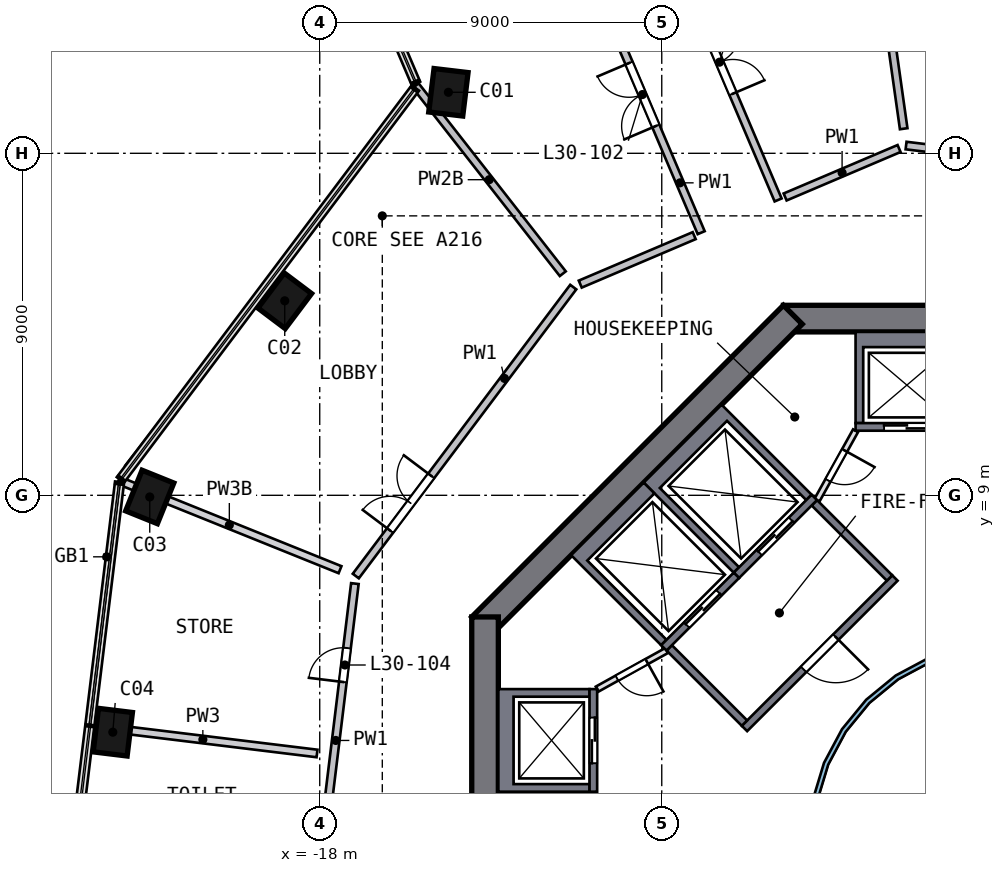
"""IFC4 building model, lengths in metres.
Left out: names, types, materials, properties, quantities, classifications, styles, units other than length and angle.
Written with IfcOpenShell. Run it as: python <this file> out.ifc"""

import sys

from ifc_helpers import new_model, si_unit, direction, frame, frame_2d, origin, origin_2d, place, context, subcontext, project, spatial, polyline, rectangle, outline, extrude, element, fill, save


model = new_model("IFC4")
c1 = context("Model", 3, precision=1e-05, world=origin(), true_north=direction((0.0, 1.0)))
c2 = subcontext(c1, "Body", "Model", "MODEL_VIEW")
j1 = project(units=[si_unit("LENGTHUNIT", "METRE"), si_unit("PLANEANGLEUNIT", "RADIAN")], contexts=[c1])
p1 = place(None, origin())
s1 = spatial("IfcSite", under=j1, at=p1, CompositionType="ELEMENT")
p2 = place(p1, origin())
s2 = spatial("IfcBuilding", under=s1, at=p2, CompositionType="ELEMENT")
p3 = place(p2, frame((0.0, 0.0, 128.0)))
s3 = spatial("IfcBuildingStorey", under=s2, at=p3, CompositionType="ELEMENT", Elevation=128.0)
p4 = place(p3, frame((-14.536, 19.665, 0.0), z_axis=(-0.065268001, -0.049080706, 0.996660008), x_axis=(0.11781391, 0.991424894, 0.056538149)))
e1 = element("IfcColumn", 1, at=p4, inside=s3, PredefinedType="COLUMN", context=c2, shape_type="SweptSolid", body=[
    extrude(rectangle(XDim=1.15, YDim=0.9, at=origin_2d()), origin(), (0.0, 0.0, 1.0), 4.706),
])
p5 = place(p3, frame((-18.865, 14.195, 0.0), z_axis=(-0.046860412, -0.063414643, 0.996886495), x_axis=(-0.599185859, -0.796717911, -0.078847169)))
e2 = element("IfcColumn", 2, at=p5, inside=s3, PredefinedType="COLUMN", context=c2, shape_type="SweptSolid", body=[
    extrude(rectangle(XDim=1.15, YDim=0.9, at=origin_2d()), origin(), (0.0, 0.0, 1.0), 4.705),
])
p6 = place(p3, frame((-22.438, 9.047, 0.0), z_axis=(-0.02957505, -0.075182891, 0.996731082), x_axis=(0.372682031, 0.924435727, 0.08078793)))
e3 = element("IfcColumn", 3, at=p6, inside=s3, PredefinedType="COLUMN", context=c2, shape_type="SweptSolid", body=[
    extrude(rectangle(XDim=1.15, YDim=0.9, at=origin_2d()), origin(), (0.0, 0.0, 1.0), 4.705),
])
p7 = place(p3, frame((-23.434, 2.861, 0.0), z_axis=(-0.008925781, -0.078360052, 0.996885165), x_axis=(-0.121168594, -0.989494135, -0.078863985)))
e4 = element("IfcColumn", 4, at=p7, inside=s3, PredefinedType="COLUMN", context=c2, shape_type="SweptSolid", body=[
    extrude(rectangle(XDim=1.15, YDim=0.9, at=origin_2d()), origin(), (0.0, 0.0, 1.0), 4.705),
])
p8 = place(p3, frame((5.799, 13.65, 0.0), z_axis=(0.0, 0.0, 1.0), x_axis=(-1.0, 0.0, 0.0)))
e5 = element("IfcWall", 5, at=p8, inside=s3, PredefinedType="SHEAR", context=c2, shape_type="SweptSolid", body=[
    extrude(rectangle(XDim=11.598, YDim=0.7, at=frame_2d((5.799, 0.0))), origin(), (0.0, 0.0, 1.0), 5.0),
])
p9 = place(p8, frame((4.899, 0.0, 0.0)))
e6 = element("IfcOpeningElement", 6, at=p9, cuts=e5, PredefinedType="OPENING", context=c2, shape_type="SweptSolid", body=[
    extrude(rectangle(XDim=1.8, YDim=2.1, at=frame_2d((0.9, 1.05))), frame((0.0, 0.36, 0.0), z_axis=(0.0, -1.0, 0.0), x_axis=(1.0, 0.0, 0.0)), (0.0, 0.0, 1.0), 0.72),
])
p10 = place(p3, frame((-5.552, 13.752, 0.0), z_axis=(0.0, 0.0, 1.0), x_axis=(-0.707106781, -0.707106781, 0.0)))
e7 = element("IfcWall", 7, at=p10, inside=s3, PredefinedType="SHEAR", context=c2, shape_type="SweptSolid", body=[
    extrude(rectangle(XDim=11.598, YDim=0.7, at=frame_2d((5.799, 0.0))), origin(), (0.0, 0.0, 1.0), 5.0),
])
p11 = place(p3, frame((-13.65, 5.799, 0.0), z_axis=(0.0, 0.0, 1.0), x_axis=(0.0, -1.0, 0.0)))
e8 = element("IfcWall", 8, at=p11, inside=s3, PredefinedType="SHEAR", context=c2, shape_type="SweptSolid", body=[
    extrude(rectangle(XDim=11.598, YDim=0.7, at=frame_2d((5.799, 0.0))), origin(), (0.0, 0.0, 1.0), 5.0),
])
p12 = place(p11, frame((4.899, 0.0, 0.0)))
e9 = element("IfcOpeningElement", 9, at=p12, cuts=e8, PredefinedType="OPENING", context=c2, shape_type="SweptSolid", body=[
    extrude(rectangle(XDim=1.8, YDim=2.1, at=frame_2d((0.9, 1.05))), frame((0.0, 0.36, 0.0), z_axis=(0.0, -1.0, 0.0), x_axis=(1.0, 0.0, 0.0)), (0.0, 0.0, 1.0), 0.72),
])
p13 = place(p3, origin())
e10 = element("IfcWall", 10, at=p13, inside=s3, PredefinedType="SOLIDWALL", context=c2, shape_type="SweptSolid", body=[
    extrude(outline(polyline([(-3.9, 10.9), (-3.9, 13.3), (-1.2, 13.3), (-1.2, 10.9), (-1.4, 10.9), (-1.4, 12.9), (-3.7, 12.9), (-3.7, 10.9), (-3.9, 10.9)])), origin(), (0.0, 0.0, 1.0), 4.69),
])
p14 = place(p3, frame((-1.2, 10.8, 0.0), z_axis=(0.0, 0.0, 1.0), x_axis=(-1.0, 0.0, 0.0)))
e11 = element("IfcWall", 11, at=p14, inside=s3, PredefinedType="SOLIDWALL", context=c2, shape_type="SweptSolid", body=[
    extrude(rectangle(XDim=2.7, YDim=0.2, at=frame_2d((1.35, 0.0))), origin(), (0.0, 0.0, 1.0), 4.69),
])
p15 = place(p14, frame((0.75, 0.0, 0.0)))
e12 = element("IfcOpeningElement", 12, at=p15, cuts=e11, PredefinedType="OPENING", context=c2, shape_type="SweptSolid", body=[
    extrude(rectangle(XDim=1.2, YDim=2.1, at=frame_2d((0.6, 1.05))), frame((0.0, 0.11, 0.0), z_axis=(0.0, -1.0, 0.0), x_axis=(1.0, 0.0, 0.0)), (0.0, 0.0, 1.0), 0.22),
])
p16 = place(p3, origin())
e13 = element("IfcWall", 13, at=p16, inside=s3, PredefinedType="SOLIDWALL", context=c2, shape_type="SweptSolid", body=[
    extrude(outline(polyline([(-13.3, 3.9), (-10.9, 3.9), (-10.9, 3.7), (-12.9, 3.7), (-12.9, 1.4), (-10.9, 1.4), (-10.9, 1.2), (-13.3, 1.2), (-13.3, 3.9)])), origin(), (0.0, 0.0, 1.0), 4.69),
])
p17 = place(p3, frame((-10.8, 1.2, 0.0), z_axis=(0.0, 0.0, 1.0), x_axis=(0.0, 1.0, 0.0)))
e14 = element("IfcWall", 14, at=p17, inside=s3, PredefinedType="SOLIDWALL", context=c2, shape_type="SweptSolid", body=[
    extrude(rectangle(XDim=2.7, YDim=0.2, at=frame_2d((1.35, 0.0))), origin(), (0.0, 0.0, 1.0), 4.69),
])
p18 = place(p17, frame((0.75, 0.0, 0.0)))
e15 = element("IfcOpeningElement", 15, at=p18, cuts=e14, PredefinedType="OPENING", context=c2, shape_type="SweptSolid", body=[
    extrude(rectangle(XDim=1.2, YDim=2.1, at=frame_2d((0.6, 1.05))), frame((0.0, 0.11, 0.0), z_axis=(0.0, -1.0, 0.0), x_axis=(1.0, 0.0, 0.0)), (0.0, 0.0, 1.0), 0.22),
])
p19 = place(p3, origin())
e16 = element("IfcWall", 16, at=p19, inside=s3, PredefinedType="SOLIDWALL", context=c2, shape_type="SweptSolid", body=[
    extrude(outline(polyline([(-9.475, 9.334), (-7.425, 11.385), (-5.056, 9.016), (-5.197, 8.874), (-7.283, 10.96), (-9.051, 9.192), (-6.965, 7.106), (-7.106, 6.965), (-9.475, 9.334)])), origin(), (0.0, 0.0, 1.0), 4.69),
])
p20 = place(p3, frame((-4.985, 8.945, 0.0), z_axis=(0.0, 0.0, 1.0), x_axis=(-0.707106781, -0.707106781, 0.0)))
e17 = element("IfcWall", 17, at=p20, inside=s3, PredefinedType="SOLIDWALL", context=c2, shape_type="SweptSolid", body=[
    extrude(rectangle(XDim=2.9, YDim=0.2, at=frame_2d((1.45, 0.0))), origin(), (0.0, 0.0, 1.0), 4.69),
])
p21 = place(p20, frame((0.85, 0.0, 0.0)))
e18 = element("IfcOpeningElement", 18, at=p21, cuts=e17, PredefinedType="OPENING", context=c2, shape_type="SweptSolid", body=[
    extrude(rectangle(XDim=1.2, YDim=2.1, at=frame_2d((0.6, 1.05))), frame((0.0, 0.11, 0.0), z_axis=(0.0, -1.0, 0.0), x_axis=(1.0, 0.0, 0.0)), (0.0, 0.0, 1.0), 0.22),
])
p22 = place(p3, origin())
e19 = element("IfcWall", 19, at=p22, inside=s3, PredefinedType="SOLIDWALL", context=c2, shape_type="SweptSolid", body=[
    extrude(outline(polyline([(-11.385, 7.425), (-9.475, 9.334), (-9.192, 9.051), (-10.96, 7.283), (-8.874, 5.197), (-9.016, 5.056), (-11.385, 7.425)])), origin(), (0.0, 0.0, 1.0), 4.69),
])
p23 = place(p3, frame((-7.036, 6.894, 0.0), z_axis=(0.0, 0.0, 1.0), x_axis=(-0.707106781, -0.707106781, 0.0)))
e20 = element("IfcWall", 20, at=p23, inside=s3, PredefinedType="SOLIDWALL", context=c2, shape_type="SweptSolid", body=[
    extrude(rectangle(XDim=2.7, YDim=0.2, at=frame_2d((1.35, 0.0))), origin(), (0.0, 0.0, 1.0), 4.69),
])
p24 = place(p23, frame((0.65, 0.0, 0.0)))
e21 = element("IfcOpeningElement", 21, at=p24, cuts=e20, PredefinedType="OPENING", context=c2, shape_type="SweptSolid", body=[
    extrude(rectangle(XDim=1.2, YDim=2.1, at=frame_2d((0.6, 1.05))), frame((0.0, 0.11, 0.0), z_axis=(0.0, -1.0, 0.0), x_axis=(1.0, 0.0, 0.0)), (0.0, 0.0, 1.0), 0.22),
])
p25 = place(p3, frame((-2.864, 6.823, 0.0), z_axis=(0.0, 0.0, 1.0), x_axis=(-0.707106781, -0.707106781, 0.0)))
e22 = element("IfcWall", 22, at=p25, inside=s3, PredefinedType="SOLIDWALL", context=c2, shape_type="SweptSolid", body=[
    extrude(rectangle(XDim=5.6, YDim=0.2, at=frame_2d((2.8, 0.0))), origin(), (0.0, 0.0, 1.0), 4.69),
])
p26 = place(p25, frame((2.2, 0.0, 0.0)))
e23 = element("IfcOpeningElement", 23, at=p26, cuts=e22, PredefinedType="OPENING", context=c2, shape_type="SweptSolid", body=[
    extrude(rectangle(XDim=1.2, YDim=2.1, at=frame_2d((0.6, 1.05))), frame((0.0, 0.11, 0.0), z_axis=(0.0, -1.0, 0.0), x_axis=(1.0, 0.0, 0.0)), (0.0, 0.0, 1.0), 0.22),
])
for number, where, z_axis, x_axis in (
    (24, (-3.005, 6.823, 0.0), (0.0, 0.0, 1.0), (-0.707, 0.707, 0.0)),
    (25, (-6.823, 3.005, 0.0), (0.0, 0.0, 1.0), (-0.707, 0.707, 0.0)),
):
    element("IfcWall", number, at=place(p3, frame(where, z_axis=z_axis, x_axis=x_axis)), inside=s3, PredefinedType="SOLIDWALL", context=c2, shape_type="SweptSolid", body=[
        extrude(rectangle(XDim=2.8, YDim=0.2, at=frame_2d((1.4, 0.0))), origin(), (0.0, 0.0, 1.0), 4.69),
    ])
p27 = place(p3, frame((-3.9, 10.7, 0.0), z_axis=(0.0, 0.0, 1.0), x_axis=(-0.485692555, -0.874129705, 0.0)))
e26 = element("IfcWall", 26, at=p27, inside=s3, PredefinedType="PARTITIONING", context=c2, shape_type="SweptSolid", body=[
    extrude(rectangle(XDim=2.089, YDim=0.15, at=frame_2d((1.044, 0.0))), origin(), (0.0, 0.0, 1.0), 4.69),
])
p28 = place(p27, frame((0.594, 0.0, 0.0)))
e27 = element("IfcOpeningElement", 27, at=p28, cuts=e26, PredefinedType="OPENING", context=c2, shape_type="SweptSolid", body=[
    extrude(rectangle(XDim=0.9, YDim=2.1, at=frame_2d((0.45, 1.05))), frame((0.0, 0.085, 0.0), z_axis=(0.0, -1.0, 0.0), x_axis=(1.0, 0.0, 0.0)), (0.0, 0.0, 1.0), 0.17),
])
p29 = place(p3, frame((-8.874, 4.914, 0.0), z_axis=(0.0, 0.0, 1.0), x_axis=(-0.874129705, -0.485692555, 0.0)))
e28 = element("IfcWall", 28, at=p29, inside=s3, PredefinedType="PARTITIONING", context=c2, shape_type="SweptSolid", body=[
    extrude(rectangle(XDim=2.089, YDim=0.15, at=frame_2d((1.044, 0.0))), origin(), (0.0, 0.0, 1.0), 4.69),
])
p30 = place(p29, frame((0.594, 0.0, 0.0)))
e29 = element("IfcOpeningElement", 29, at=p30, cuts=e28, PredefinedType="OPENING", context=c2, shape_type="SweptSolid", body=[
    extrude(rectangle(XDim=0.9, YDim=2.1, at=frame_2d((0.45, 1.05))), frame((0.0, 0.085, 0.0), z_axis=(0.0, -1.0, 0.0), x_axis=(1.0, 0.0, 0.0)), (0.0, 0.0, 1.0), 0.17),
])
p31 = place(p3, origin())
e30 = element("IfcWall", 30, at=p31, inside=s3, PredefinedType="SOLIDWALL", context=c2, shape_type="SweptSolid", body=[
    extrude(outline(polyline([(5.021, -0.999), (4.73, -1.959), (4.257, -2.844), (3.62, -3.62), (2.844, -4.257), (1.959, -4.73), (0.999, -5.021), (0.0, -5.12), (-0.999, -5.021), (-1.959, -4.73), (-2.844, -4.257), (-3.62, -3.62), (-4.257, -2.844), (-4.73, -1.959), (-5.021, -0.999), (-5.12, 0.0), (-5.021, 0.999), (-4.73, 1.959), (-4.257, 2.844), (-3.62, 3.62), (-2.844, 4.257), (-1.959, 4.73), (-0.999, 5.021), (0.0, 5.12), (0.999, 5.021), (1.959, 4.73), (2.844, 4.257), (3.62, 3.62), (4.257, 2.844), (4.73, 1.959), (5.021, 0.999), (5.12, 0.0), (5.021, -0.999)]), holes=[polyline([(4.904, 0.976), (4.619, 1.913), (4.157, 2.778), (3.535, 3.535), (2.778, 4.157), (1.913, 4.619), (0.976, 4.904), (0.0, 5.0), (-0.976, 4.904), (-1.913, 4.619), (-2.778, 4.157), (-3.535, 3.535), (-4.157, 2.778), (-4.619, 1.913), (-4.904, 0.976), (-5.0, 0.0), (-4.904, -0.976), (-4.619, -1.913), (-4.157, -2.778), (-3.535, -3.535), (-2.778, -4.157), (-1.913, -4.619), (-0.976, -4.904), (0.0, -5.0), (0.976, -4.904), (1.913, -4.619), (2.778, -4.157), (3.535, -3.535), (4.157, -2.778), (4.619, -1.913), (4.904, -0.976), (5.0, 0.0), (4.904, 0.976)])]), origin(), (0.0, 0.0, 1.0), 4.69),
])
p32 = place(p3, frame((-18.18, -2.373, 0.0), z_axis=(0.0, 0.0, 1.0), x_axis=(0.12115349, 0.992633785, 0.0)))
e31 = element("IfcWall", 31, at=p32, inside=s3, PredefinedType="SOLIDWALL", context=c2, shape_type="SweptSolid", body=[
    extrude(rectangle(XDim=9.116, YDim=0.2, at=frame_2d((4.558, 0.0))), origin(), (0.0, 0.0, 1.0), 4.69),
])
p33 = place(p32, frame((6.508, 0.0, 0.0)))
e32 = element("IfcOpeningElement", 32, at=p33, cuts=e31, PredefinedType="OPENING", context=c2, shape_type="SweptSolid", body=[
    extrude(rectangle(XDim=0.9, YDim=2.1, at=frame_2d((0.45, 1.05))), frame((0.0, 0.11, 0.0), z_axis=(0.0, -1.0, 0.0), x_axis=(1.0, 0.0, 0.0)), (0.0, 0.0, 1.0), 0.22),
])
p34 = place(p32, frame((2.508, 0.0, 0.0)))
e33 = element("IfcOpeningElement", 33, at=p34, cuts=e31, PredefinedType="OPENING", context=c2, shape_type="SweptSolid", body=[
    extrude(rectangle(XDim=0.9, YDim=2.1, at=frame_2d((0.45, 1.05))), frame((0.0, 0.11, 0.0), z_axis=(0.0, -1.0, 0.0), x_axis=(1.0, 0.0, 0.0)), (0.0, 0.0, 1.0), 0.22),
])
p35 = place(p32, frame((0.2, 0.0, 0.0)))
e34 = element("IfcOpeningElement", 34, at=p35, cuts=e31, PredefinedType="OPENING", context=c2, shape_type="SweptSolid", body=[
    extrude(rectangle(XDim=0.9, YDim=2.1, at=frame_2d((0.45, 1.05))), frame((0.0, 0.11, 0.0), z_axis=(0.0, -1.0, 0.0), x_axis=(1.0, 0.0, 0.0)), (0.0, 0.0, 1.0), 0.22),
])
p36 = place(p3, frame((-17.051, 6.875, 0.0), z_axis=(0.0, 0.0, 1.0), x_axis=(0.601259394, 0.799053904, 0.0)))
e35 = element("IfcWall", 35, at=p36, inside=s3, PredefinedType="SOLIDWALL", context=c2, shape_type="SweptSolid", body=[
    extrude(rectangle(XDim=9.517, YDim=0.2, at=frame_2d((4.758, 0.0))), origin(), (0.0, 0.0, 1.0), 4.69),
])
p37 = place(p36, frame((1.5, 0.0, 0.0)))
e36 = element("IfcOpeningElement", 36, at=p37, cuts=e35, PredefinedType="OPENING", context=c2, shape_type="SweptSolid", body=[
    extrude(rectangle(XDim=1.8, YDim=2.1, at=frame_2d((0.9, 1.05))), frame((0.0, 0.11, 0.0), z_axis=(0.0, -1.0, 0.0), x_axis=(1.0, 0.0, 0.0)), (0.0, 0.0, 1.0), 0.22),
])
p38 = place(p3, frame((-8.146, 15.833, 0.0), z_axis=(0.0, 0.0, 1.0), x_axis=(-0.920234459, -0.391367525, 0.0)))
e37 = element("IfcWall", 37, at=p38, inside=s3, PredefinedType="SOLIDWALL", context=c2, shape_type="SweptSolid", body=[
    extrude(rectangle(XDim=3.258, YDim=0.2, at=frame_2d((1.629, 0.0))), origin(), (0.0, 0.0, 1.0), 4.69),
])
p39 = place(p3, frame((-7.962, 15.911, 0.0), z_axis=(0.0, 0.0, 1.0), x_axis=(-0.39138629, 0.920226479, 0.0)))
e38 = element("IfcWall", 38, at=p39, inside=s3, PredefinedType="SOLIDWALL", context=c2, shape_type="SweptSolid", body=[
    extrude(rectangle(XDim=7.892, YDim=0.2, at=frame_2d((3.946, 0.0))), origin(), (0.0, 0.0, 1.0), 4.69),
])
p40 = place(p39, frame((3.05, 0.0, 0.0)))
e39 = element("IfcOpeningElement", 39, at=p40, cuts=e38, PredefinedType="OPENING", context=c2, shape_type="SweptSolid", body=[
    extrude(rectangle(XDim=1.8, YDim=2.1, at=frame_2d((0.9, 1.05))), frame((0.0, 0.11, 0.0), z_axis=(0.0, -1.0, 0.0), x_axis=(1.0, 0.0, 0.0)), (0.0, 0.0, 1.0), 0.22),
])
p41 = place(p3, frame((-9.026, 24.033, 0.0), z_axis=(0.0, 0.0, 1.0), x_axis=(0.391348343, -0.920242617, 0.0)))
e40 = element("IfcWall", 40, at=p41, inside=s3, PredefinedType="SOLIDWALL", context=c2, shape_type="SweptSolid", body=[
    extrude(rectangle(XDim=7.89, YDim=0.2, at=frame_2d((3.945, 0.0))), origin(), (0.0, 0.0, 1.0), 4.69),
])
p42 = place(p41, frame((3.05, 0.0, 0.0)))
e41 = element("IfcOpeningElement", 41, at=p42, cuts=e40, PredefinedType="OPENING", context=c2, shape_type="SweptSolid", body=[
    extrude(rectangle(XDim=1.8, YDim=2.1, at=frame_2d((0.9, 1.05))), frame((0.0, 0.11, 0.0), z_axis=(0.0, -1.0, 0.0), x_axis=(1.0, 0.0, 0.0)), (0.0, 0.0, 1.0), 0.22),
])
p43 = place(p3, frame((-2.756, 18.126, 0.0), z_axis=(0.0, 0.0, 1.0), x_axis=(-0.920234459, -0.391367525, 0.0)))
e42 = element("IfcWall", 42, at=p43, inside=s3, PredefinedType="SOLIDWALL", context=c2, shape_type="SweptSolid", body=[
    extrude(rectangle(XDim=3.258, YDim=0.2, at=frame_2d((1.629, 0.0))), origin(), (0.0, 0.0, 1.0), 4.69),
])
p44 = place(p3, frame((6.875, 17.051, 0.0), z_axis=(0.0, 0.0, 1.0), x_axis=(-0.992628272, 0.121198655, 0.0)))
e43 = element("IfcWall", 43, at=p44, inside=s3, PredefinedType="SOLIDWALL", context=c2, shape_type="SweptSolid", body=[
    extrude(rectangle(XDim=9.516, YDim=0.2, at=frame_2d((4.758, 0.0))), origin(), (0.0, 0.0, 1.0), 4.69),
])
p45 = place(p3, frame((-11.604, 14.832, 0.0), z_axis=(0.0, 0.0, 1.0), x_axis=(-0.61622233, 0.787572245, 0.0)))
e44 = element("IfcWall", 44, at=p45, inside=s3, PredefinedType="SOLIDWALL", context=c2, shape_type="SweptSolid", body=[
    extrude(rectangle(XDim=6.282, YDim=0.2, at=frame_2d((3.141, 0.0))), origin(), (0.0, 0.0, 1.0), 4.19),
])
p46 = place(p3, frame((-3.513, 24.867, 0.0), z_axis=(0.0, 0.0, 1.0), x_axis=(0.139908623, -0.990164419, 0.0)))
e45 = element("IfcWall", 45, at=p46, inside=s3, PredefinedType="SOLIDWALL", context=c2, shape_type="SweptSolid", body=[
    extrude(rectangle(XDim=6.282, YDim=0.2, at=frame_2d((3.141, 0.0))), origin(), (0.0, 0.0, 1.0), 4.69),
])
p47 = place(p3, frame((-18.071, 2.206, 0.0), z_axis=(0.0, 0.0, 1.0), x_axis=(-0.992632395, 0.121164881, 0.0)))
e46 = element("IfcWall", 46, at=p47, inside=s3, PredefinedType="SOLIDWALL", context=c2, shape_type="SweptSolid", body=[
    extrude(rectangle(XDim=6.053, YDim=0.2, at=frame_2d((3.026, 0.0))), origin(), (0.0, 0.0, 1.0), 4.69),
])
p48 = place(p3, frame((-17.466, 7.042, 0.0), z_axis=(0.0, 0.0, 1.0), x_axis=(-0.927449299, 0.373948925, 0.0)))
e47 = element("IfcWall", 47, at=p48, inside=s3, PredefinedType="SOLIDWALL", context=c2, shape_type="SweptSolid", body=[
    extrude(rectangle(XDim=6.282, YDim=0.2, at=frame_2d((3.141, 0.0))), origin(), (0.0, 0.0, 1.0), 4.19),
])
p49 = place(p15, origin())
e48 = element("IfcDoor", 48, at=p49, inside=s3, OperationType="DOUBLE_DOOR_SLIDING", PredefinedType="DOOR", context=c2, shape_type="SweptSolid", body=[
    extrude(rectangle(XDim=1.2, YDim=2.1, at=frame_2d((0.6, 1.05))), frame((0.0, 0.025, 0.0), z_axis=(0.0, -1.0, 0.0), x_axis=(1.0, 0.0, 0.0)), (0.0, 0.0, 1.0), 0.05),
])
fill(e12, e48)
p50 = place(p18, origin())
e49 = element("IfcDoor", 49, at=p50, inside=s3, OperationType="DOUBLE_DOOR_SLIDING", PredefinedType="DOOR", context=c2, shape_type="SweptSolid", body=[
    extrude(rectangle(XDim=1.2, YDim=2.1, at=frame_2d((0.6, 1.05))), frame((0.0, 0.025, 0.0), z_axis=(0.0, -1.0, 0.0), x_axis=(1.0, 0.0, 0.0)), (0.0, 0.0, 1.0), 0.05),
])
fill(e15, e49)
p51 = place(p21, origin())
e50 = element("IfcDoor", 50, at=p51, inside=s3, OperationType="DOUBLE_DOOR_SLIDING", PredefinedType="DOOR", context=c2, shape_type="SweptSolid", body=[
    extrude(rectangle(XDim=1.2, YDim=2.1, at=frame_2d((0.6, 1.05))), frame((0.0, 0.025, 0.0), z_axis=(0.0, -1.0, 0.0), x_axis=(1.0, 0.0, 0.0)), (0.0, 0.0, 1.0), 0.05),
])
fill(e18, e50)
p52 = place(p24, origin())
e51 = element("IfcDoor", 51, at=p52, inside=s3, OperationType="DOUBLE_DOOR_SLIDING", PredefinedType="DOOR", context=c2, shape_type="SweptSolid", body=[
    extrude(rectangle(XDim=1.2, YDim=2.1, at=frame_2d((0.6, 1.05))), frame((0.0, 0.025, 0.0), z_axis=(0.0, -1.0, 0.0), x_axis=(1.0, 0.0, 0.0)), (0.0, 0.0, 1.0), 0.05),
])
fill(e21, e51)
p53 = place(p26, origin())
e52 = element("IfcDoor", 52, at=p53, inside=s3, OperationType="SINGLE_SWING_LEFT", PredefinedType="DOOR", context=c2, shape_type="SweptSolid", body=[
    extrude(rectangle(XDim=1.2, YDim=2.1, at=frame_2d((0.6, 1.05))), frame((0.0, 0.025, 0.0), z_axis=(0.0, -1.0, 0.0), x_axis=(1.0, 0.0, 0.0)), (0.0, 0.0, 1.0), 0.05),
])
fill(e23, e52)
p54 = place(p28, origin())
e53 = element("IfcDoor", 53, at=p54, inside=s3, OperationType="SINGLE_SWING_LEFT", PredefinedType="DOOR", context=c2, shape_type="SweptSolid", body=[
    extrude(rectangle(XDim=0.9, YDim=2.1, at=frame_2d((0.45, 1.05))), frame((0.0, 0.025, 0.0), z_axis=(0.0, -1.0, 0.0), x_axis=(1.0, 0.0, 0.0)), (0.0, 0.0, 1.0), 0.05),
])
fill(e27, e53)
p55 = place(p30, origin())
e54 = element("IfcDoor", 54, at=p55, inside=s3, OperationType="SINGLE_SWING_LEFT", PredefinedType="DOOR", context=c2, shape_type="SweptSolid", body=[
    extrude(rectangle(XDim=0.9, YDim=2.1, at=frame_2d((0.45, 1.05))), frame((0.0, 0.025, 0.0), z_axis=(0.0, -1.0, 0.0), x_axis=(1.0, 0.0, 0.0)), (0.0, 0.0, 1.0), 0.05),
])
fill(e29, e54)
p56 = place(p42, origin())
e55 = element("IfcDoor", 55, at=p56, inside=s3, OperationType="DOUBLE_DOOR_SINGLE_SWING", PredefinedType="DOOR", context=c2, shape_type="SweptSolid", body=[
    extrude(rectangle(XDim=1.8, YDim=2.1, at=frame_2d((0.9, 1.05))), frame((0.0, 0.025, 0.0), z_axis=(0.0, -1.0, 0.0), x_axis=(1.0, 0.0, 0.0)), (0.0, 0.0, 1.0), 0.05),
])
fill(e41, e55)
p57 = place(p40, origin())
e56 = element("IfcDoor", 56, at=p57, inside=s3, OperationType="DOUBLE_DOOR_SINGLE_SWING", PredefinedType="DOOR", context=c2, shape_type="SweptSolid", body=[
    extrude(rectangle(XDim=1.8, YDim=2.1, at=frame_2d((0.9, 1.05))), frame((0.0, 0.025, 0.0), z_axis=(0.0, -1.0, 0.0), x_axis=(1.0, 0.0, 0.0)), (0.0, 0.0, 1.0), 0.05),
])
fill(e39, e56)
p58 = place(p37, origin())
e57 = element("IfcDoor", 57, at=p58, inside=s3, OperationType="DOUBLE_DOOR_SINGLE_SWING", PredefinedType="DOOR", context=c2, shape_type="SweptSolid", body=[
    extrude(rectangle(XDim=1.8, YDim=2.1, at=frame_2d((0.9, 1.05))), frame((0.0, 0.025, 0.0), z_axis=(0.0, -1.0, 0.0), x_axis=(1.0, 0.0, 0.0)), (0.0, 0.0, 1.0), 0.05),
])
fill(e36, e57)
p59 = place(p33, origin())
e58 = element("IfcDoor", 58, at=p59, inside=s3, OperationType="SINGLE_SWING_LEFT", PredefinedType="DOOR", context=c2, shape_type="SweptSolid", body=[
    extrude(rectangle(XDim=0.9, YDim=2.1, at=frame_2d((0.45, 1.05))), frame((0.0, 0.025, 0.0), z_axis=(0.0, -1.0, 0.0), x_axis=(1.0, 0.0, 0.0)), (0.0, 0.0, 1.0), 0.05),
])
fill(e32, e58)
save(model, sys.argv[1])
